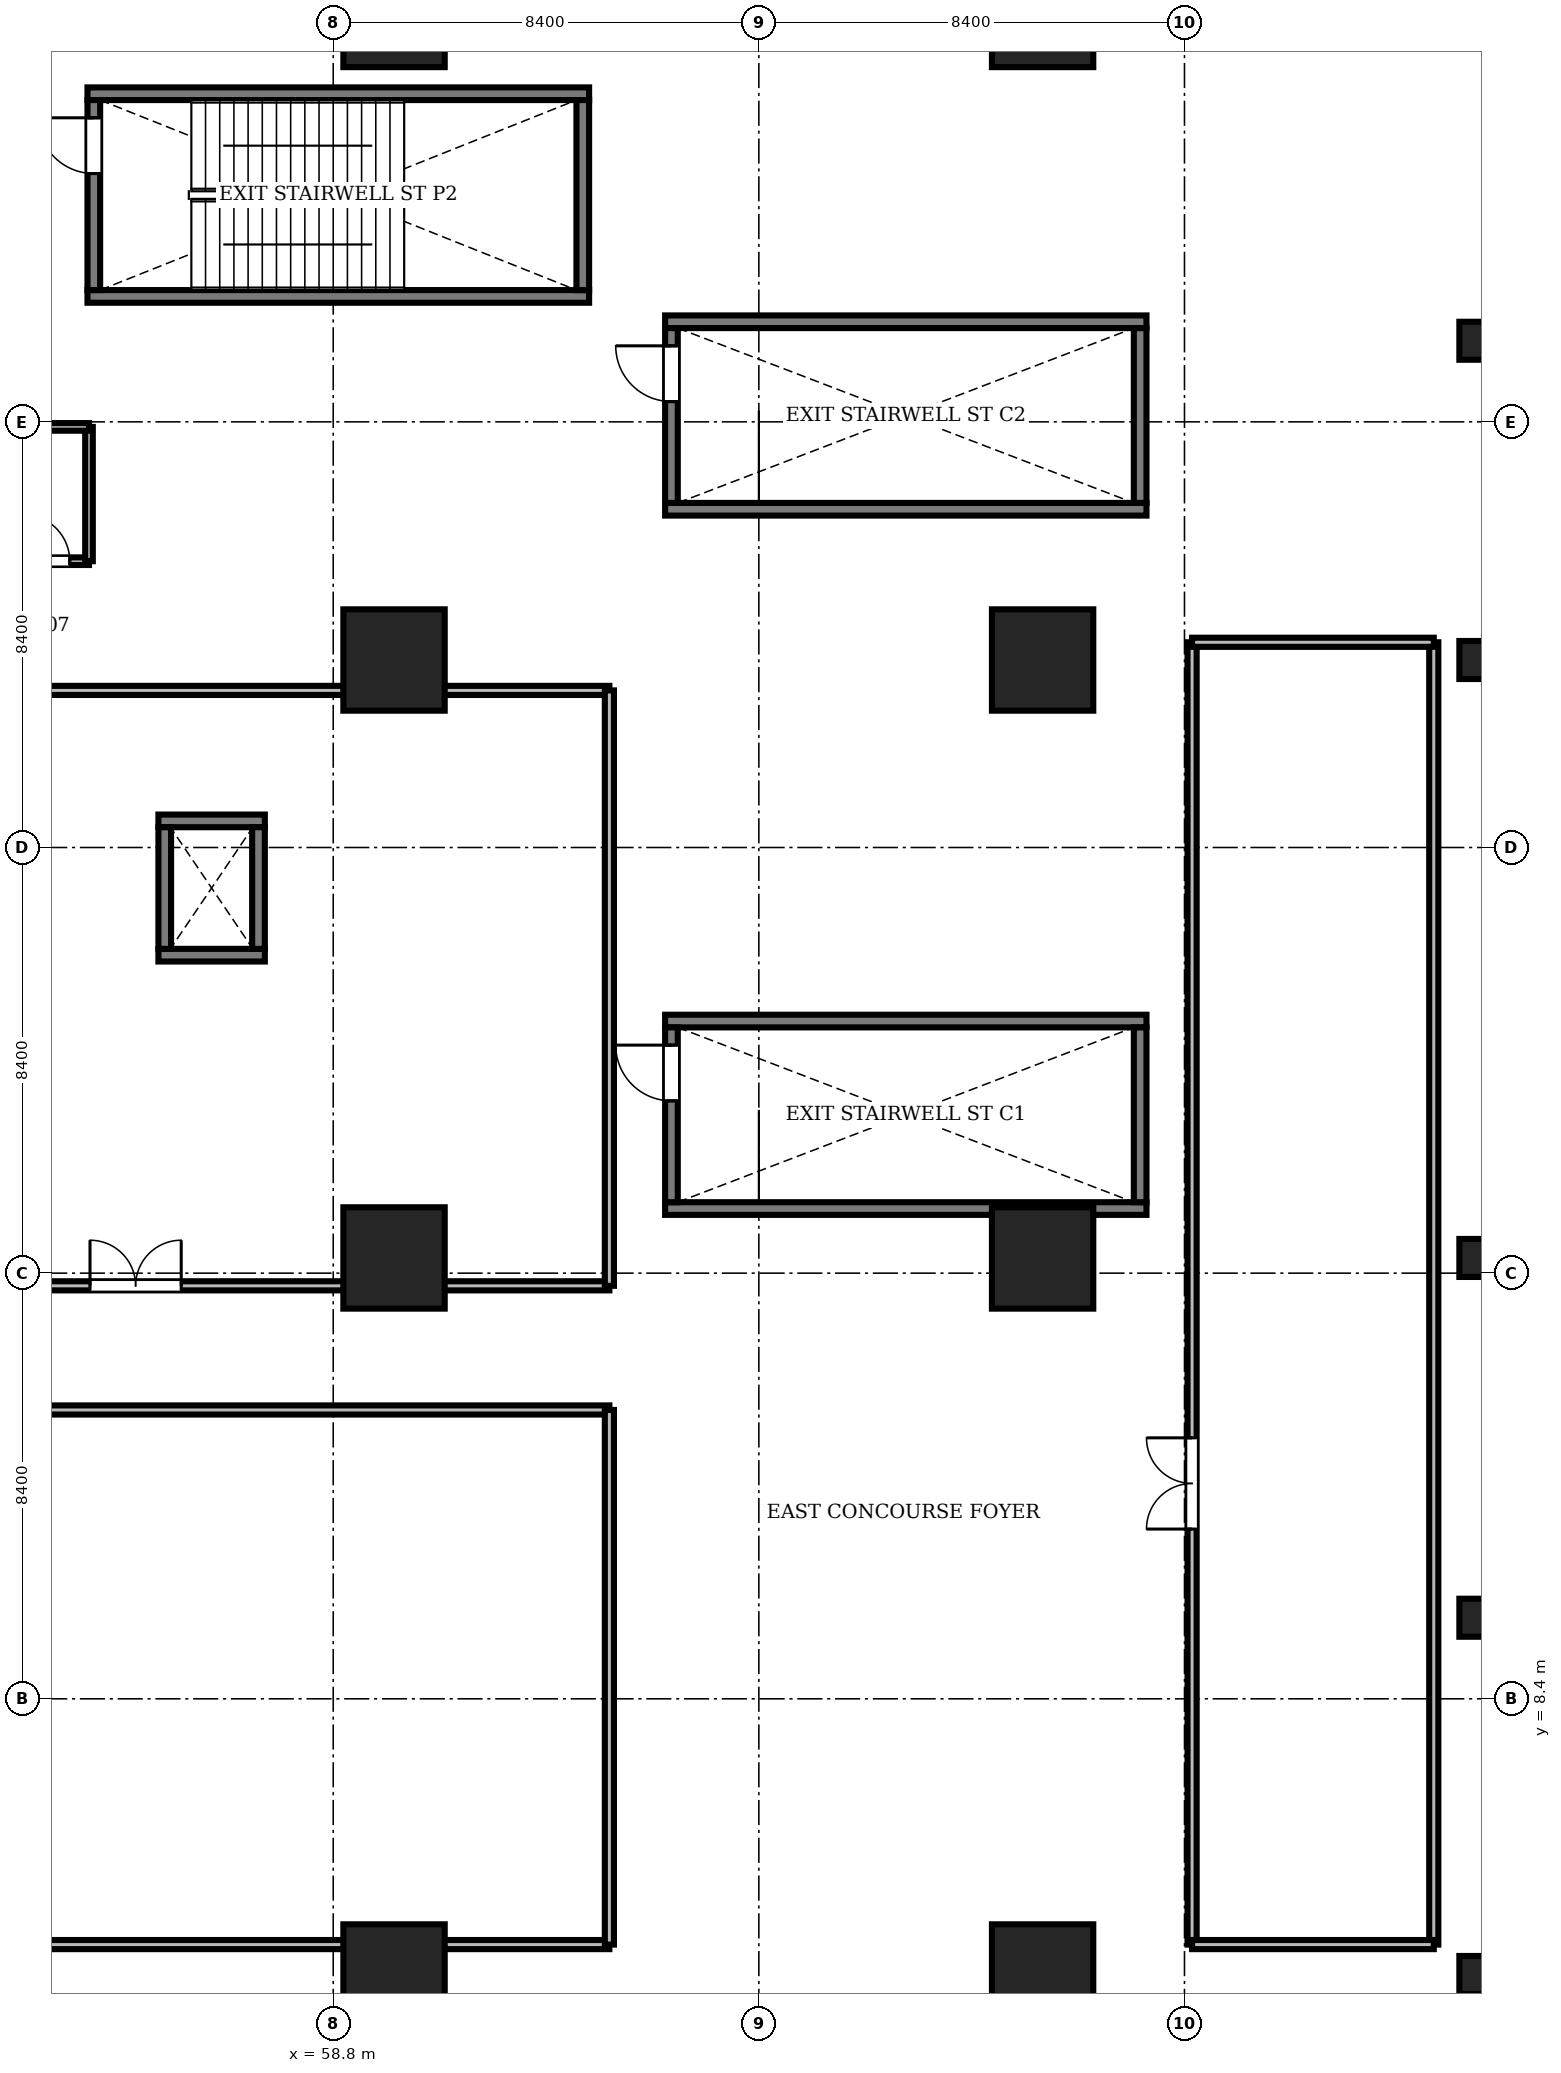
"""IFC4 building model, lengths in metres.
Left out: names, types, materials, properties, quantities, classifications, styles, units other than length and angle.
Written with IfcOpenShell. Run it as: python <this file> out.ifc"""

import sys

from ifc_helpers import new_model, si_unit, direction, frame, frame_2d, origin, origin_2d, place, context, subcontext, project, spatial, rectangle, extrude, source, transform, mapped, element, fill, save


model = new_model("IFC4")
c1 = context("Model", 3, precision=1e-05, world=origin(), true_north=direction((0.0, 1.0)))
c2 = subcontext(c1, "Body", "Model", "MODEL_VIEW")
j1 = project(units=[si_unit("LENGTHUNIT", "METRE"), si_unit("PLANEANGLEUNIT", "RADIAN")], contexts=[c1])
p1 = place(None, origin())
s1 = spatial("IfcSite", under=j1, at=p1, CompositionType="ELEMENT")
p2 = place(p1, origin())
s2 = spatial("IfcBuilding", under=s1, at=p2, CompositionType="ELEMENT")
p3 = place(p2, frame((0.0, 0.0, 11.4)))
s3 = spatial("IfcBuildingStorey", under=s2, at=p3, CompositionType="ELEMENT", Elevation=11.4)
m1 = source(origin(), c2, "Body", "SweptSolid", [
    extrude(rectangle(XDim=2.0, YDim=2.0, at=origin_2d()), origin(), (0.0, 0.0, 1.0), 5.2),
])
for number, where, z_axis, x_axis in (
    (1, (60.0, 2.95, 0.0), (0.0, 0.0, 1.0), (1.0, 0.0, 0.0)),
    (2, (72.8, 2.95, 0.0), (0.0, 0.0, 1.0), (1.0, 0.0, 0.0)),
    (3, (60.0, 17.1, 0.0), (0.0, 0.0, 1.0), (1.0, 0.0, 0.0)),
    (4, (72.8, 17.1, 0.0), (0.0, 0.0, 1.0), (1.0, 0.0, 0.0)),
    (5, (60.0, 28.9, 0.0), (0.0, 0.0, 1.0), (1.0, 0.0, 0.0)),
    (6, (72.8, 28.9, 0.0), (0.0, 0.0, 1.0), (1.0, 0.0, 0.0)),
    (7, (60.0, 41.6, 0.0), (0.0, 0.0, 1.0), (1.0, 0.0, 0.0)),
    (8, (72.8, 41.6, 0.0), (0.0, 0.0, 1.0), (1.0, 0.0, 0.0)),
):
    element("IfcColumn", number, at=place(p3, frame(where, z_axis=z_axis, x_axis=x_axis)), inside=s3, PredefinedType="COLUMN", context=c2, shape_type="MappedRepresentation", body=[
        mapped(m1, transform((0.0, 0.0, 0.0), scale=1.0)),
    ])
m2 = source(origin(), c2, "Body", "SweptSolid", [
    extrude(rectangle(XDim=0.75, YDim=0.75, at=origin_2d()), origin(), (0.0, 0.0, 1.0), 5.2),
])
for number, where, z_axis, x_axis in (
    (9, (81.4, 2.95, 0.0), (0.0, 0.0, 1.0), (1.0, 0.0, 0.0)),
    (10, (81.4, 10.0, 0.0), (0.0, 0.0, 1.0), (1.0, 0.0, 0.0)),
    (11, (81.4, 17.1, 0.0), (0.0, 0.0, 1.0), (1.0, 0.0, 0.0)),
    (12, (81.4, 28.9, 0.0), (0.0, 0.0, 1.0), (1.0, 0.0, 0.0)),
    (13, (81.4, 35.2, 0.0), (0.0, 0.0, 1.0), (1.0, 0.0, 0.0)),
):
    element("IfcColumn", number, at=place(p3, frame(where, z_axis=z_axis, x_axis=x_axis)), inside=s3, PredefinedType="COLUMN", context=c2, shape_type="MappedRepresentation", body=[
        mapped(m2, transform((0.0, 0.0, 0.0), scale=1.0)),
    ])
m3 = source(origin(), c2, "Body", "SweptSolid", [
    extrude(rectangle(XDim=9.9, YDim=0.25, at=frame_2d((4.95, 0.0))), origin(), (0.0, 0.0, 1.0), 5.4),
])
for number, where, z_axis, x_axis in (
    (14, (53.95, 36.075, 0.0), (0.0, 0.0, 1.0), (1.0, 0.0, 0.0)),
    (15, (53.95, 40.075, 0.0), (0.0, 0.0, 1.0), (1.0, 0.0, 0.0)),
):
    element("IfcWall", number, at=place(p3, frame(where, z_axis=z_axis, x_axis=x_axis)), inside=s3, PredefinedType="SOLIDWALL", context=c2, shape_type="MappedRepresentation", body=[
        mapped(m3, transform((0.0, 0.0, 0.0), scale=1.0)),
    ])
m4 = source(origin(), c2, "Body", "SweptSolid", [
    extrude(rectangle(XDim=3.75, YDim=0.25, at=frame_2d((1.875, 0.0))), origin(), (0.0, 0.0, 1.0), 5.4),
])
p4 = place(p3, frame((63.725, 36.2, 0.0), z_axis=(0.0, 0.0, 1.0), x_axis=(0.0, 1.0, 0.0)))
e16 = element("IfcWall", 16, at=p4, inside=s3, PredefinedType="SOLIDWALL", context=c2, shape_type="MappedRepresentation", body=[
    mapped(m4, transform((0.0, 0.0, 0.0), scale=1.0)),
])
p5 = place(p3, frame((54.075, 36.2, 0.0), z_axis=(0.0, 0.0, 1.0), x_axis=(0.0, 1.0, 0.0)))
e17 = element("IfcWall", 17, at=p5, inside=s3, PredefinedType="SOLIDWALL", context=c2, shape_type="MappedRepresentation", body=[
    mapped(m4, transform((0.0, 0.0, 0.0), scale=1.0)),
])
m5 = source(origin(), c2, "Body", "SweptSolid", [
    extrude(rectangle(XDim=1.1, YDim=2.2, at=frame_2d((0.55, 1.1))), frame((0.0, 0.135, 0.0), z_axis=(0.0, -1.0, 0.0), x_axis=(1.0, 0.0, 0.0)), (0.0, 0.0, 1.0), 0.27),
])
p6 = place(p5, frame((2.3, 0.0, 0.0)))
e18 = element("IfcOpeningElement", 18, at=p6, cuts=e17, PredefinedType="OPENING", context=c2, shape_type="MappedRepresentation", body=[
    mapped(m5, transform((0.0, 0.0, 0.0), scale=1.0)),
])
m6 = source(origin(), c2, "Body", "SweptSolid", [
    extrude(rectangle(XDim=9.5, YDim=0.25, at=frame_2d((4.75, 0.0))), origin(), (0.0, 0.0, 1.0), 5.2),
])
for number, where, z_axis, x_axis in (
    (19, (65.35, 18.075, 0.0), (0.0, 0.0, 1.0), (1.0, 0.0, 0.0)),
    (20, (65.35, 21.775, 0.0), (0.0, 0.0, 1.0), (1.0, 0.0, 0.0)),
):
    element("IfcWall", number, at=place(p3, frame(where, z_axis=z_axis, x_axis=x_axis)), inside=s3, PredefinedType="SOLIDWALL", context=c2, shape_type="MappedRepresentation", body=[
        mapped(m6, transform((0.0, 0.0, 0.0), scale=1.0)),
    ])
m7 = source(origin(), c2, "Body", "SweptSolid", [
    extrude(rectangle(XDim=3.45, YDim=0.25, at=frame_2d((1.725, 0.0))), origin(), (0.0, 0.0, 1.0), 5.2),
])
p7 = place(p3, frame((74.725, 18.2, 0.0), z_axis=(0.0, 0.0, 1.0), x_axis=(0.0, 1.0, 0.0)))
e21 = element("IfcWall", 21, at=p7, inside=s3, PredefinedType="SOLIDWALL", context=c2, shape_type="MappedRepresentation", body=[
    mapped(m7, transform((0.0, 0.0, 0.0), scale=1.0)),
])
p8 = place(p3, frame((65.475, 18.2, 0.0), z_axis=(0.0, 0.0, 1.0), x_axis=(0.0, 1.0, 0.0)))
e22 = element("IfcWall", 22, at=p8, inside=s3, PredefinedType="SOLIDWALL", context=c2, shape_type="MappedRepresentation", body=[
    mapped(m7, transform((0.0, 0.0, 0.0), scale=1.0)),
])
p9 = place(p8, frame((2.0, 0.0, 0.0)))
e23 = element("IfcOpeningElement", 23, at=p9, cuts=e22, PredefinedType="OPENING", context=c2, shape_type="MappedRepresentation", body=[
    mapped(m5, transform((0.0, 0.0, 0.0), scale=1.0)),
])
for number, where, z_axis, x_axis in (
    (24, (65.35, 31.875, 0.0), (0.0, 0.0, 1.0), (1.0, 0.0, 0.0)),
    (25, (65.35, 35.575, 0.0), (0.0, 0.0, 1.0), (1.0, 0.0, 0.0)),
):
    element("IfcWall", number, at=place(p3, frame(where, z_axis=z_axis, x_axis=x_axis)), inside=s3, PredefinedType="SOLIDWALL", context=c2, shape_type="MappedRepresentation", body=[
        mapped(m6, transform((0.0, 0.0, 0.0), scale=1.0)),
    ])
p10 = place(p3, frame((74.725, 32.0, 0.0), z_axis=(0.0, 0.0, 1.0), x_axis=(0.0, 1.0, 0.0)))
e26 = element("IfcWall", 26, at=p10, inside=s3, PredefinedType="SOLIDWALL", context=c2, shape_type="MappedRepresentation", body=[
    mapped(m7, transform((0.0, 0.0, 0.0), scale=1.0)),
])
p11 = place(p3, frame((65.475, 32.0, 0.0), z_axis=(0.0, 0.0, 1.0), x_axis=(0.0, 1.0, 0.0)))
e27 = element("IfcWall", 27, at=p11, inside=s3, PredefinedType="SOLIDWALL", context=c2, shape_type="MappedRepresentation", body=[
    mapped(m7, transform((0.0, 0.0, 0.0), scale=1.0)),
])
p12 = place(p11, frame((2.0, 0.0, 0.0)))
e28 = element("IfcOpeningElement", 28, at=p12, cuts=e27, PredefinedType="OPENING", context=c2, shape_type="MappedRepresentation", body=[
    mapped(m5, transform((0.0, 0.0, 0.0), scale=1.0)),
])
m8 = source(origin(), c2, "Body", "SweptSolid", [
    extrude(rectangle(XDim=2.1, YDim=0.25, at=frame_2d((1.05, 0.0))), origin(), (0.0, 0.0, 1.0), 5.2),
])
for number, where, z_axis, x_axis in (
    (29, (55.35, 23.075, 0.0), (0.0, 0.0, 1.0), (1.0, 0.0, 0.0)),
    (30, (55.35, 25.725, 0.0), (0.0, 0.0, 1.0), (1.0, 0.0, 0.0)),
):
    element("IfcWall", number, at=place(p3, frame(where, z_axis=z_axis, x_axis=x_axis)), inside=s3, PredefinedType="SOLIDWALL", context=c2, shape_type="MappedRepresentation", body=[
        mapped(m8, transform((0.0, 0.0, 0.0), scale=1.0)),
    ])
m9 = source(origin(), c2, "Body", "SweptSolid", [
    extrude(rectangle(XDim=2.4, YDim=0.25, at=frame_2d((1.2, 0.0))), origin(), (0.0, 0.0, 1.0), 5.2),
])
for number, where, z_axis, x_axis in (
    (31, (55.475, 23.2, 0.0), (0.0, 0.0, 1.0), (0.0, 1.0, 0.0)),
    (32, (57.325, 23.2, 0.0), (0.0, 0.0, 1.0), (0.0, 1.0, 0.0)),
):
    element("IfcWall", number, at=place(p3, frame(where, z_axis=z_axis, x_axis=x_axis)), inside=s3, PredefinedType="SOLIDWALL", context=c2, shape_type="MappedRepresentation", body=[
        mapped(m9, transform((0.0, 0.0, 0.0), scale=1.0)),
    ])
m10 = source(origin(), c2, "Body", "SweptSolid", [
    extrude(rectangle(XDim=30.25, YDim=0.18, at=frame_2d((15.125, 0.0))), origin(), (0.0, 0.0, 1.0), 3.392),
])
p13 = place(p3, frame((34.0, 14.1, 0.0), z_axis=(0.0, 0.0, 1.0), x_axis=(1.0, 0.0, 0.0)))
e33 = element("IfcWall", 33, at=p13, inside=s3, PredefinedType="PARTITIONING", context=c2, shape_type="MappedRepresentation", body=[
    mapped(m10, transform((0.0, 0.0, 0.0), scale=1.0)),
])
m11 = source(origin(), c2, "Body", "SweptSolid", [
    extrude(rectangle(XDim=1.8, YDim=2.4, at=frame_2d((0.9, 1.2))), frame((0.0, 0.1, 0.0), z_axis=(0.0, -1.0, 0.0), x_axis=(1.0, 0.0, 0.0)), (0.0, 0.0, 1.0), 0.2),
])
p14 = place(p13, frame((10.0, 0.0, 0.0)))
e34 = element("IfcOpeningElement", 34, at=p14, cuts=e33, PredefinedType="OPENING", context=c2, shape_type="MappedRepresentation", body=[
    mapped(m11, transform((0.0, 0.0, 0.0), scale=1.0)),
])
m12 = source(origin(), c2, "Body", "SweptSolid", [
    extrude(rectangle(XDim=25.7, YDim=0.18, at=frame_2d((12.85, 0.0))), origin(), (0.0, 0.0, 1.0), 4.668),
])
p15 = place(p3, frame((75.75, 3.55, 0.0), z_axis=(0.0, 0.0, 1.0), x_axis=(0.0, 1.0, 0.0)))
e35 = element("IfcWall", 35, at=p15, inside=s3, PredefinedType="PARTITIONING", context=c2, shape_type="MappedRepresentation", body=[
    mapped(m12, transform((0.0, 0.0, 0.0), scale=1.0)),
])
p16 = place(p15, frame((8.2, 0.0, 0.0)))
e36 = element("IfcOpeningElement", 36, at=p16, cuts=e35, PredefinedType="OPENING", context=c2, shape_type="MappedRepresentation", body=[
    mapped(m11, transform((0.0, 0.0, 0.0), scale=1.0)),
])
m13 = source(origin(), c2, "Body", "SweptSolid", [
    extrude(rectangle(XDim=14.75, YDim=0.18, at=frame_2d((7.375, 0.0))), origin(), (0.0, 0.0, 1.0), 4.592),
])
p17 = place(p3, frame((49.5, 16.55, 0.0), z_axis=(0.0, 0.0, 1.0), x_axis=(1.0, 0.0, 0.0)))
e37 = element("IfcWall", 37, at=p17, inside=s3, PredefinedType="PARTITIONING", context=c2, shape_type="MappedRepresentation", body=[
    mapped(m13, transform((0.0, 0.0, 0.0), scale=1.0)),
])
p18 = place(p17, frame((4.5, 0.0, 0.0)))
e38 = element("IfcOpeningElement", 38, at=p18, cuts=e37, PredefinedType="OPENING", context=c2, shape_type="MappedRepresentation", body=[
    mapped(m11, transform((0.0, 0.0, 0.0), scale=1.0)),
])
m14 = source(origin(), c2, "Body", "SweptSolid", [
    extrude(rectangle(XDim=1.62, YDim=0.15, at=frame_2d((0.81, 0.0))), origin(), (0.0, 0.0, 1.0), 5.2),
])
p19 = place(p3, frame((52.36, 30.85, 0.0), z_axis=(0.0, 0.0, 1.0), x_axis=(1.0, 0.0, 0.0)))
e39 = element("IfcWall", 39, at=p19, inside=s3, PredefinedType="PARTITIONING", context=c2, shape_type="MappedRepresentation", body=[
    mapped(m14, transform((0.0, 0.0, 0.0), scale=1.0)),
])
m15 = source(origin(), c2, "Body", "SweptSolid", [
    extrude(rectangle(XDim=0.92, YDim=2.1, at=frame_2d((0.46, 1.05))), frame((0.0, 0.085, 0.0), z_axis=(0.0, -1.0, 0.0), x_axis=(1.0, 0.0, 0.0)), (0.0, 0.0, 1.0), 0.17),
])
p20 = place(p19, frame((0.32, 0.0, 0.0)))
e40 = element("IfcOpeningElement", 40, at=p20, cuts=e39, PredefinedType="OPENING", context=c2, shape_type="MappedRepresentation", body=[
    mapped(m15, transform((0.0, 0.0, 0.0), scale=1.0)),
])
p21 = place(p3, frame((34.0, 3.55, 0.0), z_axis=(0.0, 0.0, 1.0), x_axis=(1.0, 0.0, 0.0)))
e41 = element("IfcWall", 41, at=p21, inside=s3, PredefinedType="PARTITIONING", context=c2, shape_type="MappedRepresentation", body=[
    mapped(m10, transform((0.0, 0.0, 0.0), scale=1.0)),
])
p22 = place(p3, frame((80.52, 3.55, 0.0), z_axis=(0.0, 0.0, 1.0), x_axis=(0.0, 1.0, 0.0)))
e42 = element("IfcWall", 42, at=p22, inside=s3, PredefinedType="PARTITIONING", context=c2, shape_type="MappedRepresentation", body=[
    mapped(m12, transform((0.0, 0.0, 0.0), scale=1.0)),
])
p23 = place(p3, frame((49.5, 28.3, 0.0), z_axis=(0.0, 0.0, 1.0), x_axis=(1.0, 0.0, 0.0)))
e43 = element("IfcWall", 43, at=p23, inside=s3, PredefinedType="PARTITIONING", context=c2, shape_type="MappedRepresentation", body=[
    mapped(m13, transform((0.0, 0.0, 0.0), scale=1.0)),
])
m16 = source(origin(), c2, "Body", "SweptSolid", [
    extrude(rectangle(XDim=11.75, YDim=0.18, at=frame_2d((5.875, 0.0))), origin(), (0.0, 0.0, 1.0), 4.668),
])
p24 = place(p3, frame((64.25, 16.55, 0.0), z_axis=(0.0, 0.0, 1.0), x_axis=(0.0, 1.0, 0.0)))
e44 = element("IfcWall", 44, at=p24, inside=s3, PredefinedType="PARTITIONING", context=c2, shape_type="MappedRepresentation", body=[
    mapped(m16, transform((0.0, 0.0, 0.0), scale=1.0)),
])
m17 = source(origin(), c2, "Body", "SweptSolid", [
    extrude(rectangle(XDim=10.55, YDim=0.18, at=frame_2d((5.275, 0.0))), origin(), (0.0, 0.0, 1.0), 4.792),
])
p25 = place(p3, frame((64.25, 3.55, 0.0), z_axis=(0.0, 0.0, 1.0), x_axis=(0.0, 1.0, 0.0)))
e45 = element("IfcWall", 45, at=p25, inside=s3, PredefinedType="PARTITIONING", context=c2, shape_type="MappedRepresentation", body=[
    mapped(m17, transform((0.0, 0.0, 0.0), scale=1.0)),
])
m18 = source(origin(), c2, "Body", "SweptSolid", [
    extrude(rectangle(XDim=4.77, YDim=0.18, at=frame_2d((2.385, 0.0))), origin(), (0.0, 0.0, 1.0), 5.2),
])
for number, where, z_axis, x_axis in (
    (46, (75.75, 3.55, 0.0), (0.0, 0.0, 1.0), (1.0, 0.0, 0.0)),
    (47, (75.75, 29.25, 0.0), (0.0, 0.0, 1.0), (1.0, 0.0, 0.0)),
):
    element("IfcWall", number, at=place(p3, frame(where, z_axis=z_axis, x_axis=x_axis)), inside=s3, PredefinedType="PARTITIONING", context=c2, shape_type="MappedRepresentation", body=[
        mapped(m18, transform((0.0, 0.0, 0.0), scale=1.0)),
    ])
m19 = source(origin(), c2, "Body", "SweptSolid", [
    extrude(rectangle(XDim=2.65, YDim=0.15, at=frame_2d((1.325, 0.0))), origin(), (0.0, 0.0, 1.0), 5.2),
])
p26 = place(p3, frame((53.98, 30.85, 0.0), z_axis=(0.0, 0.0, 1.0), x_axis=(0.0, 1.0, 0.0)))
e48 = element("IfcWall", 48, at=p26, inside=s3, PredefinedType="PARTITIONING", context=c2, shape_type="MappedRepresentation", body=[
    mapped(m19, transform((0.0, 0.0, 0.0), scale=1.0)),
])
p27 = place(p3, frame((52.36, 33.5, 0.0), z_axis=(0.0, 0.0, 1.0), x_axis=(1.0, 0.0, 0.0)))
e49 = element("IfcWall", 49, at=p27, inside=s3, PredefinedType="PARTITIONING", context=c2, shape_type="MappedRepresentation", body=[
    mapped(m14, transform((0.0, 0.0, 0.0), scale=1.0)),
])
m20 = source(origin(), c2, "Body", "SweptSolid", [
    extrude(rectangle(XDim=1.1, YDim=2.2, at=frame_2d((0.55, 1.1))), frame((0.0, 0.025, 0.0), z_axis=(0.0, -1.0, 0.0), x_axis=(1.0, 0.0, 0.0)), (0.0, 0.0, 1.0), 0.05),
])
p28 = place(p6, origin())
e50 = element("IfcDoor", 50, at=p28, inside=s3, OperationType="SINGLE_SWING_RIGHT", PredefinedType="DOOR", context=c2, shape_type="MappedRepresentation", body=[
    mapped(m20, transform((0.0, 0.0, 0.0), scale=1.0)),
])
fill(e18, e50)
p29 = place(p9, origin())
e51 = element("IfcDoor", 51, at=p29, inside=s3, OperationType="SINGLE_SWING_RIGHT", PredefinedType="DOOR", context=c2, shape_type="MappedRepresentation", body=[
    mapped(m20, transform((0.0, 0.0, 0.0), scale=1.0)),
])
fill(e23, e51)
p30 = place(p12, origin())
e52 = element("IfcDoor", 52, at=p30, inside=s3, OperationType="SINGLE_SWING_RIGHT", PredefinedType="DOOR", context=c2, shape_type="MappedRepresentation", body=[
    mapped(m20, transform((0.0, 0.0, 0.0), scale=1.0)),
])
fill(e28, e52)
m21 = source(origin(), c2, "Body", "SweptSolid", [
    extrude(rectangle(XDim=1.8, YDim=2.4, at=frame_2d((0.9, 1.2))), frame((0.0, 0.025, 0.0), z_axis=(0.0, -1.0, 0.0), x_axis=(1.0, 0.0, 0.0)), (0.0, 0.0, 1.0), 0.05),
])
p31 = place(p16, origin())
e53 = element("IfcDoor", 53, at=p31, inside=s3, OperationType="DOUBLE_DOOR_SINGLE_SWING", PredefinedType="DOOR", context=c2, shape_type="MappedRepresentation", body=[
    mapped(m21, transform((0.0, 0.0, 0.0), scale=1.0)),
])
fill(e36, e53)
p32 = place(p18, origin())
e54 = element("IfcDoor", 54, at=p32, inside=s3, OperationType="DOUBLE_DOOR_SINGLE_SWING", PredefinedType="DOOR", context=c2, shape_type="MappedRepresentation", body=[
    mapped(m21, transform((0.0, 0.0, 0.0), scale=1.0)),
])
fill(e38, e54)
m22 = source(origin(), c2, "Body", "SweptSolid", [
    extrude(rectangle(XDim=0.92, YDim=2.1, at=frame_2d((0.46, 1.05))), frame((0.0, 0.025, 0.0), z_axis=(0.0, -1.0, 0.0), x_axis=(1.0, 0.0, 0.0)), (0.0, 0.0, 1.0), 0.05),
])
p33 = place(p20, origin())
e55 = element("IfcDoor", 55, at=p33, inside=s3, OperationType="SINGLE_SWING_LEFT", PredefinedType="DOOR", context=c2, shape_type="MappedRepresentation", body=[
    mapped(m22, transform((0.0, 0.0, 0.0), scale=1.0)),
])
fill(e40, e55)
save(model, sys.argv[1])
